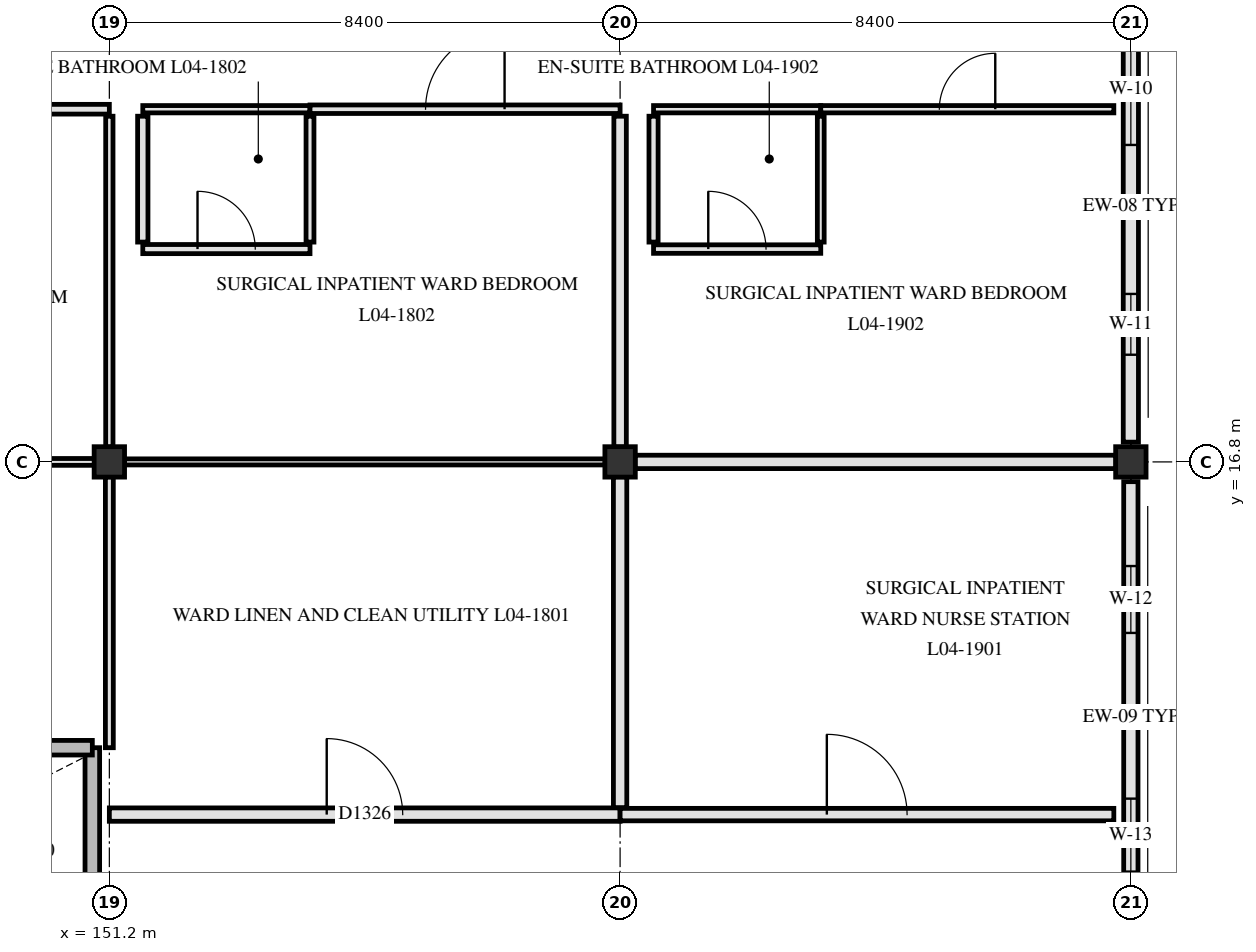
"""IFC4 building model, lengths in metres.
Left out: names, types, materials, properties, quantities, classifications, styles, units other than length and angle.
Written with IfcOpenShell. Run it as: python <this file> out.ifc"""

import sys

from ifc_helpers import new_model, si_unit, direction, frame, frame_2d, origin, origin_2d, place, context, subcontext, project, spatial, rectangle, extrude, element, fill, save


model = new_model("IFC4")
c1 = context("Model", 3, precision=1e-05, world=origin(), true_north=direction((0.0, 1.0)))
c2 = subcontext(c1, "Body", "Model", "MODEL_VIEW")
j1 = project(units=[si_unit("LENGTHUNIT", "METRE"), si_unit("PLANEANGLEUNIT", "RADIAN")], contexts=[c1])
p1 = place(None, origin())
s1 = spatial("IfcSite", under=j1, at=p1, CompositionType="ELEMENT")
p2 = place(p1, origin())
s2 = spatial("IfcBuilding", under=s1, at=p2, CompositionType="ELEMENT")
p3 = place(p2, frame((0.0, 0.0, 18.6)))
s3 = spatial("IfcBuildingStorey", under=s2, at=p3, CompositionType="ELEMENT", Elevation=18.6)
for number, where, z_axis, x_axis in (
    (1, (151.2, 16.8, 0.0), (0.0, 0.0, 1.0), (1.0, 0.0, 0.0)),
    (2, (159.6, 16.8, 0.0), (0.0, 0.0, 1.0), (1.0, 0.0, 0.0)),
    (3, (168.0, 16.8, 0.0), (0.0, 0.0, 1.0), (1.0, 0.0, 0.0)),
):
    element("IfcColumn", number, at=place(p3, frame(where, z_axis=z_axis, x_axis=x_axis)), inside=s3, PredefinedType="COLUMN", context=c2, shape_type="SweptSolid", body=[
        extrude(rectangle(XDim=0.5, YDim=0.5, at=origin_2d()), origin(), (0.0, 0.0, 1.0), 3.9),
    ])
p4 = place(p3, frame((168.0, 24.875, 0.0), z_axis=(0.0, 0.0, 1.0), x_axis=(0.0, -1.0, 0.0)))
e4 = element("IfcWall", 4, at=p4, inside=s3, PredefinedType="SOLIDWALL", context=c2, shape_type="SweptSolid", body=[
    extrude(rectangle(XDim=7.75, YDim=0.25, at=frame_2d((3.875, 0.0))), origin(), (0.0, 0.0, 1.0), 3.37),
])
p5 = place(p4, frame((1.012, 0.0, 0.85)))
e5 = element("IfcOpeningElement", 5, at=p5, cuts=e4, PredefinedType="OPENING", context=c2, shape_type="SweptSolid", body=[
    extrude(rectangle(XDim=1.85, YDim=1.3, at=frame_2d((0.925, 0.65))), frame((0.0, 0.135, 0.0), z_axis=(0.0, -1.0, 0.0), x_axis=(1.0, 0.0, 0.0)), (0.0, 0.0, 1.0), 0.27),
])
p6 = place(p4, frame((5.312, 0.0, 0.85)))
e6 = element("IfcOpeningElement", 6, at=p6, cuts=e4, PredefinedType="OPENING", context=c2, shape_type="SweptSolid", body=[
    extrude(rectangle(XDim=1.0, YDim=1.42, at=frame_2d((0.5, 0.71))), frame((0.0, 0.135, 0.0), z_axis=(0.0, -1.0, 0.0), x_axis=(1.0, 0.0, 0.0)), (0.0, 0.0, 1.0), 0.27),
])
p7 = place(p3, frame((168.0, 16.475, 0.0), z_axis=(0.0, 0.0, 1.0), x_axis=(0.0, -1.0, 0.0)))
e7 = element("IfcWall", 7, at=p7, inside=s3, PredefinedType="SOLIDWALL", context=c2, shape_type="SweptSolid", body=[
    extrude(rectangle(XDim=7.75, YDim=0.235, at=frame_2d((3.875, 0.0))), origin(), (0.0, 0.0, 1.0), 3.37),
])
p8 = place(p7, frame((1.387, 0.0, 0.85)))
e8 = element("IfcOpeningElement", 8, at=p8, cuts=e7, PredefinedType="OPENING", context=c2, shape_type="SweptSolid", body=[
    extrude(rectangle(XDim=1.1, YDim=1.42, at=frame_2d((0.55, 0.71))), frame((0.0, 0.127, 0.0), z_axis=(0.0, -1.0, 0.0), x_axis=(1.0, 0.0, 0.0)), (0.0, 0.0, 1.0), 0.255),
])
p9 = place(p7, frame((5.212, 0.0, 0.85)))
e9 = element("IfcOpeningElement", 9, at=p9, cuts=e7, PredefinedType="OPENING", context=c2, shape_type="SweptSolid", body=[
    extrude(rectangle(XDim=1.2, YDim=1.42, at=frame_2d((0.6, 0.71))), frame((0.0, 0.127, 0.0), z_axis=(0.0, -1.0, 0.0), x_axis=(1.0, 0.0, 0.0)), (0.0, 0.0, 1.0), 0.255),
])
p10 = place(p3, frame((150.92, 8.78, 0.0), z_axis=(0.0, 0.0, 1.0), x_axis=(0.0, 1.0, 0.0)))
e10 = element("IfcWall", 10, at=p10, inside=s3, PredefinedType="SHEAR", context=c2, shape_type="SweptSolid", body=[
    extrude(rectangle(XDim=3.32, YDim=0.24, at=frame_2d((1.66, 0.0))), origin(), (0.0, 0.0, 1.0), 3.62),
])
p11 = place(p3, frame((143.1, 12.1, 0.0), z_axis=(0.0, 0.0, 1.0), x_axis=(1.0, 0.0, 0.0)))
e11 = element("IfcWall", 11, at=p11, inside=s3, PredefinedType="SHEAR", context=c2, shape_type="SweptSolid", body=[
    extrude(rectangle(XDim=7.82, YDim=0.24, at=frame_2d((3.91, 0.0))), origin(), (0.0, 0.0, 1.0), 3.62),
])
p12 = place(p11, frame((0.25, 0.0, 0.0)))
e12 = element("IfcOpeningElement", 12, at=p12, cuts=e11, PredefinedType="OPENING", context=c2, shape_type="SweptSolid", body=[
    extrude(rectangle(XDim=1.45, YDim=2.2, at=frame_2d((0.725, 1.1))), frame((0.0, 0.13, 0.0), z_axis=(0.0, -1.0, 0.0), x_axis=(1.0, 0.0, 0.0)), (0.0, 0.0, 1.0), 0.26),
])
p13 = place(p3, frame((151.2, 11.0, 0.0), z_axis=(0.0, 0.0, 1.0), x_axis=(1.0, 0.0, 0.0)))
e13 = element("IfcWall", 13, at=p13, inside=s3, PredefinedType="PARTITIONING", context=c2, shape_type="SweptSolid", body=[
    extrude(rectangle(XDim=8.4, YDim=0.22, at=frame_2d((4.2, 0.0))), origin(), (0.0, 0.0, 1.0), 3.25),
])
p14 = place(p13, frame((3.575, 0.0, 0.0)))
e14 = element("IfcOpeningElement", 14, at=p14, cuts=e13, PredefinedType="OPENING", context=c2, shape_type="SweptSolid", body=[
    extrude(rectangle(XDim=1.25, YDim=2.2, at=frame_2d((0.625, 1.1))), frame((0.0, 0.12, 0.0), z_axis=(0.0, -1.0, 0.0), x_axis=(1.0, 0.0, 0.0)), (0.0, 0.0, 1.0), 0.24),
])
p15 = place(p3, frame((159.6, 11.0, 0.0), z_axis=(0.0, 0.0, 1.0), x_axis=(1.0, 0.0, 0.0)))
e15 = element("IfcWall", 15, at=p15, inside=s3, PredefinedType="PARTITIONING", context=c2, shape_type="SweptSolid", body=[
    extrude(rectangle(XDim=8.12, YDim=0.205, at=frame_2d((4.06, 0.0))), origin(), (0.0, 0.0, 1.0), 3.25),
])
p16 = place(p15, frame((3.4, 0.0, 0.0)))
e16 = element("IfcOpeningElement", 16, at=p16, cuts=e15, PredefinedType="OPENING", context=c2, shape_type="SweptSolid", body=[
    extrude(rectangle(XDim=1.32, YDim=2.18, at=frame_2d((0.66, 1.09))), frame((0.0, 0.113, 0.0), z_axis=(0.0, -1.0, 0.0), x_axis=(1.0, 0.0, 0.0)), (0.0, 0.0, 1.0), 0.225),
])
p17 = place(p3, frame((146.15, 16.8, 0.0), z_axis=(0.0, 0.0, 1.0), x_axis=(1.0, 0.0, 0.0)))
e17 = element("IfcWall", 17, at=p17, inside=s3, PredefinedType="PARTITIONING", context=c2, shape_type="SweptSolid", body=[
    extrude(rectangle(XDim=4.805, YDim=0.112, at=frame_2d((2.403, 0.0))), origin(), (0.0, 0.0, 1.0), 3.16),
])
p18 = place(p17, frame((1.502, 0.0, 0.0)))
e18 = element("IfcOpeningElement", 18, at=p18, cuts=e17, PredefinedType="OPENING", context=c2, shape_type="SweptSolid", body=[
    extrude(rectangle(XDim=1.8, YDim=2.25, at=frame_2d((0.9, 1.125))), frame((0.0, 0.066, 0.0), z_axis=(0.0, -1.0, 0.0), x_axis=(1.0, 0.0, 0.0)), (0.0, 0.0, 1.0), 0.132),
])
p19 = place(p3, frame((151.445, 16.8, 0.0), z_axis=(0.0, 0.0, 1.0), x_axis=(1.0, 0.0, 0.0)))
e19 = element("IfcWall", 19, at=p19, inside=s3, PredefinedType="PARTITIONING", context=c2, shape_type="SweptSolid", body=[
    extrude(rectangle(XDim=7.91, YDim=0.1, at=frame_2d((3.955, 0.0))), origin(), (0.0, 0.0, 1.0), 3.15),
])
p20 = place(p3, frame((159.845, 16.8, 0.0), z_axis=(0.0, 0.0, 1.0), x_axis=(1.0, 0.0, 0.0)))
e20 = element("IfcWall", 20, at=p20, inside=s3, PredefinedType="PARTITIONING", context=c2, shape_type="SweptSolid", body=[
    extrude(rectangle(XDim=7.91, YDim=0.22, at=frame_2d((3.955, 0.0))), origin(), (0.0, 0.0, 1.0), 3.15),
])
p21 = place(p3, frame((151.75, 20.3, 0.0), z_axis=(0.0, 0.0, 1.0), x_axis=(1.0, 0.0, 0.0)))
e21 = element("IfcWall", 21, at=p21, inside=s3, PredefinedType="PARTITIONING", context=c2, shape_type="SweptSolid", body=[
    extrude(rectangle(XDim=2.75, YDim=0.15, at=frame_2d((1.375, 0.0))), origin(), (0.0, 0.0, 1.0), 3.61),
])
p22 = place(p21, frame((0.9, 0.0, 0.0)))
e22 = element("IfcOpeningElement", 22, at=p22, cuts=e21, PredefinedType="OPENING", context=c2, shape_type="SweptSolid", body=[
    extrude(rectangle(XDim=0.95, YDim=2.1, at=frame_2d((0.475, 1.05))), frame((0.0, 0.085, 0.0), z_axis=(0.0, -1.0, 0.0), x_axis=(1.0, 0.0, 0.0)), (0.0, 0.0, 1.0), 0.17),
])
p23 = place(p3, frame((160.15, 20.3, 0.0), z_axis=(0.0, 0.0, 1.0), x_axis=(1.0, 0.0, 0.0)))
e23 = element("IfcWall", 23, at=p23, inside=s3, PredefinedType="PARTITIONING", context=c2, shape_type="SweptSolid", body=[
    extrude(rectangle(XDim=2.75, YDim=0.14, at=frame_2d((1.375, 0.0))), origin(), (0.0, 0.0, 1.0), 3.61),
])
p24 = place(p23, frame((0.9, 0.0, 0.0)))
e24 = element("IfcOpeningElement", 24, at=p24, cuts=e23, PredefinedType="OPENING", context=c2, shape_type="SweptSolid", body=[
    extrude(rectangle(XDim=0.95, YDim=2.1, at=frame_2d((0.475, 1.05))), frame((0.0, 0.08, 0.0), z_axis=(0.0, -1.0, 0.0), x_axis=(1.0, 0.0, 0.0)), (0.0, 0.0, 1.0), 0.16),
])
p25 = place(p3, frame((146.1, 22.6, 0.0), z_axis=(0.0, 0.0, 1.0), x_axis=(1.0, 0.0, 0.0)))
e25 = element("IfcWall", 25, at=p25, inside=s3, PredefinedType="PARTITIONING", context=c2, shape_type="SweptSolid", body=[
    extrude(rectangle(XDim=5.1, YDim=0.16, at=frame_2d((2.55, 0.0))), origin(), (0.0, 0.0, 1.0), 3.25),
])
p26 = place(p3, frame((151.75, 22.6, 0.0), z_axis=(0.0, 0.0, 1.0), x_axis=(1.0, 0.0, 0.0)))
e26 = element("IfcWall", 26, at=p26, inside=s3, PredefinedType="PARTITIONING", context=c2, shape_type="SweptSolid", body=[
    extrude(rectangle(XDim=2.75, YDim=0.12, at=frame_2d((1.375, 0.0))), origin(), (0.0, 0.0, 1.0), 3.61),
])
p27 = place(p3, frame((154.5, 22.6, 0.0), z_axis=(0.0, 0.0, 1.0), x_axis=(1.0, 0.0, 0.0)))
e27 = element("IfcWall", 27, at=p27, inside=s3, PredefinedType="PARTITIONING", context=c2, shape_type="SweptSolid", body=[
    extrude(rectangle(XDim=5.1, YDim=0.14, at=frame_2d((2.55, 0.0))), origin(), (0.0, 0.0, 1.0), 3.25),
])
p28 = place(p27, frame((1.9, 0.0, 0.0)))
e28 = element("IfcOpeningElement", 28, at=p28, cuts=e27, PredefinedType="OPENING", context=c2, shape_type="SweptSolid", body=[
    extrude(rectangle(XDim=1.3, YDim=2.2, at=frame_2d((0.65, 1.1))), frame((0.0, 0.08, 0.0), z_axis=(0.0, -1.0, 0.0), x_axis=(1.0, 0.0, 0.0)), (0.0, 0.0, 1.0), 0.16),
])
p29 = place(p3, frame((160.15, 22.6, 0.0), z_axis=(0.0, 0.0, 1.0), x_axis=(1.0, 0.0, 0.0)))
e29 = element("IfcWall", 29, at=p29, inside=s3, PredefinedType="PARTITIONING", context=c2, shape_type="SweptSolid", body=[
    extrude(rectangle(XDim=2.75, YDim=0.12, at=frame_2d((1.375, 0.0))), origin(), (0.0, 0.0, 1.0), 3.61),
])
p30 = place(p3, frame((162.9, 22.6, 0.0), z_axis=(0.0, 0.0, 1.0), x_axis=(1.0, 0.0, 0.0)))
e30 = element("IfcWall", 30, at=p30, inside=s3, PredefinedType="PARTITIONING", context=c2, shape_type="SweptSolid", body=[
    extrude(rectangle(XDim=4.82, YDim=0.12, at=frame_2d((2.41, 0.0))), origin(), (0.0, 0.0, 1.0), 3.61),
])
p31 = place(p30, frame((1.95, 0.0, 0.0)))
e31 = element("IfcOpeningElement", 31, at=p31, cuts=e30, PredefinedType="OPENING", context=c2, shape_type="SweptSolid", body=[
    extrude(rectangle(XDim=0.92, YDim=2.08, at=frame_2d((0.46, 1.04))), frame((0.0, 0.07, 0.0), z_axis=(0.0, -1.0, 0.0), x_axis=(1.0, 0.0, 0.0)), (0.0, 0.0, 1.0), 0.14),
])
p32 = place(p3, frame((151.2, 12.1, 0.0), z_axis=(0.0, 0.0, 1.0), x_axis=(0.0, 1.0, 0.0)))
e32 = element("IfcWall", 32, at=p32, inside=s3, PredefinedType="PARTITIONING", context=c2, shape_type="SweptSolid", body=[
    extrude(rectangle(XDim=4.455, YDim=0.13, at=frame_2d((2.228, 0.0))), origin(), (0.0, 0.0, 1.0), 3.25),
])
p33 = place(p3, frame((151.2, 17.045, 0.0), z_axis=(0.0, 0.0, 1.0), x_axis=(0.0, 1.0, 0.0)))
e33 = element("IfcWall", 33, at=p33, inside=s3, PredefinedType="PARTITIONING", context=c2, shape_type="SweptSolid", body=[
    extrude(rectangle(XDim=5.44, YDim=0.12, at=frame_2d((2.72, 0.0))), origin(), (0.0, 0.0, 1.0), 3.25),
])
p34 = place(p3, frame((151.75, 20.415, 0.0), z_axis=(0.0, 0.0, 1.0), x_axis=(0.0, 1.0, 0.0)))
e34 = element("IfcWall", 34, at=p34, inside=s3, PredefinedType="PARTITIONING", context=c2, shape_type="SweptSolid", body=[
    extrude(rectangle(XDim=2.07, YDim=0.17, at=frame_2d((1.035, 0.0))), origin(), (0.0, 0.0, 1.0), 3.3),
])
p35 = place(p3, frame((154.5, 20.415, 0.0), z_axis=(0.0, 0.0, 1.0), x_axis=(0.0, 1.0, 0.0)))
e35 = element("IfcWall", 35, at=p35, inside=s3, PredefinedType="PARTITIONING", context=c2, shape_type="SweptSolid", body=[
    extrude(rectangle(XDim=2.07, YDim=0.13, at=frame_2d((1.035, 0.0))), origin(), (0.0, 0.0, 1.0), 3.3),
])
p36 = place(p3, frame((159.6, 11.115, 0.0), z_axis=(0.0, 0.0, 1.0), x_axis=(0.0, 1.0, 0.0)))
e36 = element("IfcWall", 36, at=p36, inside=s3, PredefinedType="PARTITIONING", context=c2, shape_type="SweptSolid", body=[
    extrude(rectangle(XDim=5.44, YDim=0.22, at=frame_2d((2.72, 0.0))), origin(), (0.0, 0.0, 1.0), 3.25),
])
p37 = place(p3, frame((159.6, 17.045, 0.0), z_axis=(0.0, 0.0, 1.0), x_axis=(0.0, 1.0, 0.0)))
e37 = element("IfcWall", 37, at=p37, inside=s3, PredefinedType="PARTITIONING", context=c2, shape_type="SweptSolid", body=[
    extrude(rectangle(XDim=5.44, YDim=0.205, at=frame_2d((2.72, 0.0))), origin(), (0.0, 0.0, 1.0), 3.25),
])
p38 = place(p3, frame((160.15, 20.415, 0.0), z_axis=(0.0, 0.0, 1.0), x_axis=(0.0, 1.0, 0.0)))
e38 = element("IfcWall", 38, at=p38, inside=s3, PredefinedType="PARTITIONING", context=c2, shape_type="SweptSolid", body=[
    extrude(rectangle(XDim=2.07, YDim=0.15, at=frame_2d((1.035, 0.0))), origin(), (0.0, 0.0, 1.0), 3.3),
])
p39 = place(p3, frame((162.9, 20.415, 0.0), z_axis=(0.0, 0.0, 1.0), x_axis=(0.0, 1.0, 0.0)))
e39 = element("IfcWall", 39, at=p39, inside=s3, PredefinedType="PARTITIONING", context=c2, shape_type="SweptSolid", body=[
    extrude(rectangle(XDim=2.07, YDim=0.112, at=frame_2d((1.035, 0.0))), origin(), (0.0, 0.0, 1.0), 3.3),
])
p40 = place(p5, origin())
e40 = element("IfcWindow", 40, at=p40, inside=s3, PartitioningType="SINGLE_PANEL", PredefinedType="WINDOW", context=c2, shape_type="SweptSolid", body=[
    extrude(rectangle(XDim=1.85, YDim=1.3, at=frame_2d((0.925, 0.65))), frame((0.0, 0.03, 0.0), z_axis=(0.0, -1.0, 0.0), x_axis=(1.0, 0.0, 0.0)), (0.0, 0.0, 1.0), 0.06),
])
fill(e5, e40)
p41 = place(p6, origin())
e41 = element("IfcWindow", 41, at=p41, inside=s3, PartitioningType="SINGLE_PANEL", PredefinedType="WINDOW", context=c2, shape_type="SweptSolid", body=[
    extrude(rectangle(XDim=1.0, YDim=1.42, at=frame_2d((0.5, 0.71))), frame((0.0, 0.03, 0.0), z_axis=(0.0, -1.0, 0.0), x_axis=(1.0, 0.0, 0.0)), (0.0, 0.0, 1.0), 0.06),
])
fill(e6, e41)
p42 = place(p8, origin())
e42 = element("IfcWindow", 42, at=p42, inside=s3, PartitioningType="SINGLE_PANEL", PredefinedType="WINDOW", context=c2, shape_type="SweptSolid", body=[
    extrude(rectangle(XDim=1.1, YDim=1.42, at=frame_2d((0.55, 0.71))), frame((0.0, 0.03, 0.0), z_axis=(0.0, -1.0, 0.0), x_axis=(1.0, 0.0, 0.0)), (0.0, 0.0, 1.0), 0.06),
])
fill(e8, e42)
p43 = place(p9, origin())
e43 = element("IfcWindow", 43, at=p43, inside=s3, PartitioningType="SINGLE_PANEL", PredefinedType="WINDOW", context=c2, shape_type="SweptSolid", body=[
    extrude(rectangle(XDim=1.2, YDim=1.42, at=frame_2d((0.6, 0.71))), frame((0.0, 0.03, 0.0), z_axis=(0.0, -1.0, 0.0), x_axis=(1.0, 0.0, 0.0)), (0.0, 0.0, 1.0), 0.06),
])
fill(e9, e43)
p44 = place(p14, origin())
e44 = element("IfcDoor", 44, at=p44, inside=s3, OperationType="SINGLE_SWING_LEFT", PredefinedType="DOOR", context=c2, shape_type="SweptSolid", body=[
    extrude(rectangle(XDim=1.25, YDim=2.2, at=frame_2d((0.625, 1.1))), frame((0.0, 0.025, 0.0), z_axis=(0.0, -1.0, 0.0), x_axis=(1.0, 0.0, 0.0)), (0.0, 0.0, 1.0), 0.05),
])
fill(e14, e44)
p45 = place(p28, origin())
e45 = element("IfcDoor", 45, at=p45, inside=s3, OperationType="SINGLE_SWING_RIGHT", PredefinedType="DOOR", context=c2, shape_type="SweptSolid", body=[
    extrude(rectangle(XDim=1.3, YDim=2.2, at=frame_2d((0.65, 1.1))), frame((0.0, 0.025, 0.0), z_axis=(0.0, -1.0, 0.0), x_axis=(1.0, 0.0, 0.0)), (0.0, 0.0, 1.0), 0.05),
])
fill(e28, e45)
p46 = place(p22, origin())
e46 = element("IfcDoor", 46, at=p46, inside=s3, OperationType="SINGLE_SWING_LEFT", PredefinedType="DOOR", context=c2, shape_type="SweptSolid", body=[
    extrude(rectangle(XDim=0.95, YDim=2.1, at=frame_2d((0.475, 1.05))), frame((0.0, 0.025, 0.0), z_axis=(0.0, -1.0, 0.0), x_axis=(1.0, 0.0, 0.0)), (0.0, 0.0, 1.0), 0.05),
])
fill(e22, e46)
p47 = place(p16, origin())
e47 = element("IfcDoor", 47, at=p47, inside=s3, OperationType="SINGLE_SWING_LEFT", PredefinedType="DOOR", context=c2, shape_type="SweptSolid", body=[
    extrude(rectangle(XDim=1.32, YDim=2.18, at=frame_2d((0.66, 1.09))), frame((0.0, 0.025, 0.0), z_axis=(0.0, -1.0, 0.0), x_axis=(1.0, 0.0, 0.0)), (0.0, 0.0, 1.0), 0.05),
])
fill(e16, e47)
p48 = place(p31, origin())
e48 = element("IfcDoor", 48, at=p48, inside=s3, OperationType="SINGLE_SWING_RIGHT", PredefinedType="DOOR", context=c2, shape_type="SweptSolid", body=[
    extrude(rectangle(XDim=0.92, YDim=2.08, at=frame_2d((0.46, 1.04))), frame((0.0, 0.025, 0.0), z_axis=(0.0, -1.0, 0.0), x_axis=(1.0, 0.0, 0.0)), (0.0, 0.0, 1.0), 0.05),
])
fill(e31, e48)
p49 = place(p24, origin())
e49 = element("IfcDoor", 49, at=p49, inside=s3, OperationType="SINGLE_SWING_LEFT", PredefinedType="DOOR", context=c2, shape_type="SweptSolid", body=[
    extrude(rectangle(XDim=0.95, YDim=2.1, at=frame_2d((0.475, 1.05))), frame((0.0, 0.025, 0.0), z_axis=(0.0, -1.0, 0.0), x_axis=(1.0, 0.0, 0.0)), (0.0, 0.0, 1.0), 0.05),
])
fill(e24, e49)
save(model, sys.argv[1])
